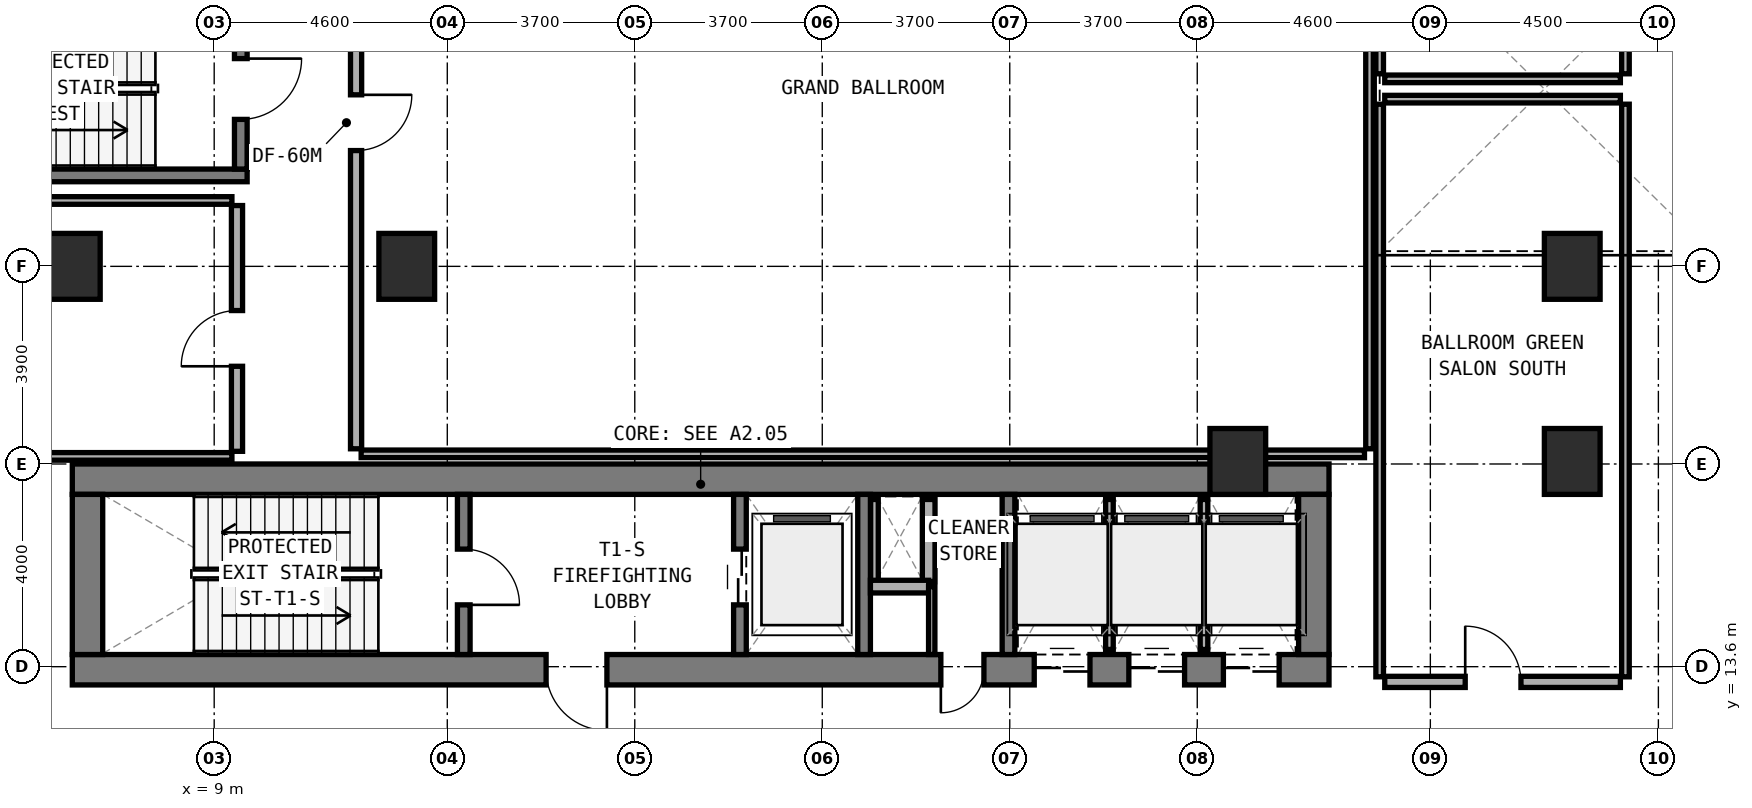
"""IFC4 building model, lengths in metres.
Left out: names, types, materials, properties, quantities, classifications, styles, units other than length and angle.
Written with IfcOpenShell. Run it as: python <this file> out.ifc"""

import sys

from ifc_helpers import new_model, si_unit, direction, frame, frame_2d, origin, origin_2d, place, context, subcontext, project, spatial, rectangle, extrude, element, fill, save


model = new_model("IFC4")
c1 = context("Model", 3, precision=1e-05, world=origin(), true_north=direction((0.0, 1.0)))
c2 = subcontext(c1, "Body", "Model", "MODEL_VIEW")
j1 = project(units=[si_unit("LENGTHUNIT", "METRE"), si_unit("PLANEANGLEUNIT", "RADIAN")], contexts=[c1])
p1 = place(None, origin())
s1 = spatial("IfcSite", under=j1, at=p1, CompositionType="ELEMENT")
p2 = place(p1, origin())
s2 = spatial("IfcBuilding", under=s1, at=p2, CompositionType="ELEMENT")
p3 = place(p2, frame((0.0, 0.0, 10.2)))
s3 = spatial("IfcBuildingStorey", under=s2, at=p3, CompositionType="ELEMENT", Elevation=10.2)
p4 = place(p3, frame((6.2, 13.54, 0.0), z_axis=(0.0, 0.0, 1.0), x_axis=(1.0, 0.0, 0.0)))
e1 = element("IfcWall", 1, at=p4, inside=s3, PredefinedType="SHEAR", context=c2, shape_type="SweptSolid", body=[
    extrude(rectangle(XDim=24.8, YDim=0.6, at=frame_2d((12.4, 0.0))), origin(), (0.0, 0.0, 1.0), 4.8),
])
p5 = place(p4, frame((9.35, 0.0, 0.0)))
e2 = element("IfcOpeningElement", 2, at=p5, cuts=e1, PredefinedType="OPENING", context=c2, shape_type="SweptSolid", body=[
    extrude(rectangle(XDim=1.2, YDim=2.15, at=frame_2d((0.6, 1.075))), frame((0.0, 0.31, 0.0), z_axis=(0.0, -1.0, 0.0), x_axis=(1.0, 0.0, 0.0)), (0.0, 0.0, 1.0), 0.62),
])
p6 = place(p4, frame((17.14, 0.0, 0.0)))
e3 = element("IfcOpeningElement", 3, at=p6, cuts=e1, PredefinedType="OPENING", context=c2, shape_type="SweptSolid", body=[
    extrude(rectangle(XDim=0.85, YDim=2.1, at=frame_2d((0.425, 1.05))), frame((0.0, 0.31, 0.0), z_axis=(0.0, -1.0, 0.0), x_axis=(1.0, 0.0, 0.0)), (0.0, 0.0, 1.0), 0.62),
])
p7 = place(p4, frame((18.983, 0.0, 0.0)))
e4 = element("IfcOpeningElement", 4, at=p7, cuts=e1, PredefinedType="OPENING", context=c2, shape_type="SweptSolid", body=[
    extrude(rectangle(XDim=1.1, YDim=2.15, at=frame_2d((0.55, 1.075))), frame((0.0, 0.31, 0.0), z_axis=(0.0, -1.0, 0.0), x_axis=(1.0, 0.0, 0.0)), (0.0, 0.0, 1.0), 0.62),
])
p8 = place(p4, frame((20.85, 0.0, 0.0)))
e5 = element("IfcOpeningElement", 5, at=p8, cuts=e1, PredefinedType="OPENING", context=c2, shape_type="SweptSolid", body=[
    extrude(rectangle(XDim=1.1, YDim=2.15, at=frame_2d((0.55, 1.075))), frame((0.0, 0.31, 0.0), z_axis=(0.0, -1.0, 0.0), x_axis=(1.0, 0.0, 0.0)), (0.0, 0.0, 1.0), 0.62),
])
p9 = place(p4, frame((22.716, 0.0, 0.0)))
e6 = element("IfcOpeningElement", 6, at=p9, cuts=e1, PredefinedType="OPENING", context=c2, shape_type="SweptSolid", body=[
    extrude(rectangle(XDim=1.1, YDim=2.15, at=frame_2d((0.55, 1.075))), frame((0.0, 0.31, 0.0), z_axis=(0.0, -1.0, 0.0), x_axis=(1.0, 0.0, 0.0)), (0.0, 0.0, 1.0), 0.62),
])
p10 = place(p3, frame((6.2, 17.3, 0.0), z_axis=(0.0, 0.0, 1.0), x_axis=(1.0, 0.0, 0.0)))
e7 = element("IfcWall", 7, at=p10, inside=s3, PredefinedType="SHEAR", context=c2, shape_type="SweptSolid", body=[
    extrude(rectangle(XDim=24.8, YDim=0.6, at=frame_2d((12.4, 0.0))), origin(), (0.0, 0.0, 1.0), 4.8),
])
for number, where, z_axis, x_axis in (
    (8, (6.5, 13.84, 0.0), (0.0, 0.0, 1.0), (0.0, 1.0, 0.0)),
    (9, (30.7, 13.84, 0.0), (0.0, 0.0, 1.0), (0.0, 1.0, 0.0)),
):
    element("IfcWall", number, at=place(p3, frame(where, z_axis=z_axis, x_axis=x_axis)), inside=s3, PredefinedType="SHEAR", context=c2, shape_type="SweptSolid", body=[
        extrude(rectangle(XDim=3.16, YDim=0.6, at=frame_2d((1.58, 0.0))), origin(), (0.0, 0.0, 1.0), 4.8),
    ])
p11 = place(p3, frame((13.925, 13.84, 0.0), z_axis=(0.0, 0.0, 1.0), x_axis=(0.0, 1.0, 0.0)))
e10 = element("IfcWall", 10, at=p11, inside=s3, PredefinedType="STANDARD", context=c2, shape_type="SweptSolid", body=[
    extrude(rectangle(XDim=3.16, YDim=0.25, at=frame_2d((1.58, 0.0))), origin(), (0.0, 0.0, 1.0), 4.45),
])
p12 = place(p11, frame((0.98, 0.0, 0.0)))
e11 = element("IfcOpeningElement", 11, at=p12, cuts=e10, PredefinedType="OPENING", context=c2, shape_type="SweptSolid", body=[
    extrude(rectangle(XDim=1.1, YDim=2.15, at=frame_2d((0.55, 1.075))), frame((0.0, 0.135, 0.0), z_axis=(0.0, -1.0, 0.0), x_axis=(1.0, 0.0, 0.0)), (0.0, 0.0, 1.0), 0.27),
])
p13 = place(p3, frame((19.375, 13.84, 0.0), z_axis=(0.0, 0.0, 1.0), x_axis=(0.0, 1.0, 0.0)))
e12 = element("IfcWall", 12, at=p13, inside=s3, PredefinedType="STANDARD", context=c2, shape_type="SweptSolid", body=[
    extrude(rectangle(XDim=3.16, YDim=0.25, at=frame_2d((1.58, 0.0))), origin(), (0.0, 0.0, 1.0), 4.45),
])
p14 = place(p13, frame((0.98, 0.0, 0.0)))
e13 = element("IfcOpeningElement", 13, at=p14, cuts=e12, PredefinedType="OPENING", context=c2, shape_type="SweptSolid", body=[
    extrude(rectangle(XDim=1.1, YDim=2.15, at=frame_2d((0.55, 1.075))), frame((0.0, 0.135, 0.0), z_axis=(0.0, -1.0, 0.0), x_axis=(1.0, 0.0, 0.0)), (0.0, 0.0, 1.0), 0.27),
])
for number, where, z_axis, x_axis in (
    (14, (21.825, 13.84, 0.0), (0.0, 0.0, 1.0), (0.0, 1.0, 0.0)),
    (15, (24.675, 13.84, 0.0), (0.0, 0.0, 1.0), (0.0, 1.0, 0.0)),
):
    element("IfcWall", number, at=place(p3, frame(where, z_axis=z_axis, x_axis=x_axis)), inside=s3, PredefinedType="STANDARD", context=c2, shape_type="SweptSolid", body=[
        extrude(rectangle(XDim=3.16, YDim=0.25, at=frame_2d((1.58, 0.0))), origin(), (0.0, 0.0, 1.0), 4.45),
    ])
p15 = place(p3, frame((2.15, 23.295, 0.0), z_axis=(0.0, 0.0, 1.0), x_axis=(1.0, 0.0, 0.0)))
e16 = element("IfcWall", 16, at=p15, inside=s3, PredefinedType="STANDARD", context=c2, shape_type="SweptSolid", body=[
    extrude(rectangle(XDim=7.5, YDim=0.25, at=frame_2d((3.75, 0.0))), origin(), (0.0, 0.0, 1.0), 4.8),
])
p16 = place(p3, frame((9.525, 23.42, 0.0), z_axis=(0.0, 0.0, 1.0), x_axis=(0.0, 1.0, 0.0)))
e17 = element("IfcWall", 17, at=p16, inside=s3, PredefinedType="STANDARD", context=c2, shape_type="SweptSolid", body=[
    extrude(rectangle(XDim=3.16, YDim=0.25, at=frame_2d((1.58, 0.0))), origin(), (0.0, 0.0, 1.0), 4.8),
])
p17 = place(p16, frame((0.98, 0.0, 0.0)))
e18 = element("IfcOpeningElement", 18, at=p17, cuts=e17, PredefinedType="OPENING", context=c2, shape_type="SweptSolid", body=[
    extrude(rectangle(XDim=1.2, YDim=2.15, at=frame_2d((0.6, 1.075))), frame((0.0, 0.135, 0.0), z_axis=(0.0, -1.0, 0.0), x_axis=(1.0, 0.0, 0.0)), (0.0, 0.0, 1.0), 0.27),
])
for number, where, z_axis, x_axis in (
    (19, (6.2, 21.5, 0.0), (0.0, 0.0, 1.0), (1.0, 0.0, 0.0)),
    (20, (35.8, 21.5, 0.0), (0.0, 0.0, 1.0), (1.0, 0.0, 0.0)),
    (21, (35.8, 17.65, 0.0), (0.0, 0.0, 1.0), (1.0, 0.0, 0.0)),
    (22, (12.8, 21.5, 0.0), (0.0, 0.0, 1.0), (1.0, 0.0, 0.0)),
    (23, (29.2, 17.65, 0.0), (0.0, 0.0, 1.0), (1.0, 0.0, 0.0)),
):
    element("IfcColumn", number, at=place(p3, frame(where, z_axis=z_axis, x_axis=x_axis)), inside=s3, PredefinedType="COLUMN", context=c2, shape_type="SweptSolid", body=[
        extrude(rectangle(XDim=1.1, YDim=1.3, at=origin_2d()), origin(), (0.0, 0.0, 1.0), 4.8),
    ])
p18 = place(p3, frame((22.03, 15.28, 0.0), z_axis=(0.0, 0.0, 1.0), x_axis=(0.0, 1.0, 0.0)))
e24 = element("IfcWall", 24, at=p18, inside=s3, PredefinedType="PARTITIONING", context=c2, shape_type="SweptSolid", body=[
    extrude(rectangle(XDim=1.62, YDim=0.15, at=frame_2d((0.81, 0.0))), origin(), (0.0, 0.0, 1.0), 4.45),
])
p19 = place(p3, frame((23.1, 15.28, 0.0), z_axis=(0.0, 0.0, 1.0), x_axis=(0.0, 1.0, 0.0)))
e25 = element("IfcWall", 25, at=p19, inside=s3, PredefinedType="SOLIDWALL", context=c2, shape_type="SweptSolid", body=[
    extrude(rectangle(XDim=1.62, YDim=0.25, at=frame_2d((0.81, 0.0))), origin(), (0.0, 0.0, 1.0), 4.45),
])
p20 = place(p3, frame((21.95, 15.18, 0.0), z_axis=(0.0, 0.0, 1.0), x_axis=(1.0, 0.0, 0.0)))
e26 = element("IfcWall", 26, at=p20, inside=s3, PredefinedType="SOLIDWALL", context=c2, shape_type="SweptSolid", body=[
    extrude(rectangle(XDim=1.15, YDim=0.25, at=frame_2d((0.575, 0.0))), origin(), (0.0, 0.0, 1.0), 4.45),
])
p21 = place(p3, frame((23.16, 13.84, 0.0), z_axis=(0.0, 0.0, 1.0), x_axis=(0.0, 1.0, 0.0)))
e27 = element("IfcWall", 27, at=p21, inside=s3, PredefinedType="PARTITIONING", context=c2, shape_type="SweptSolid", body=[
    extrude(rectangle(XDim=1.34, YDim=0.125, at=frame_2d((0.67, 0.0))), origin(), (0.0, 0.0, 1.0), 4.45),
])
p22 = place(p3, frame((26.667, 13.94, 0.0), z_axis=(0.0, 0.0, 1.0), x_axis=(0.0, 1.0, 0.0)))
e28 = element("IfcWall", 28, at=p22, inside=s3, PredefinedType="PARTITIONING", context=c2, shape_type="SweptSolid", body=[
    extrude(rectangle(XDim=2.96, YDim=0.15, at=frame_2d((1.48, 0.0))), origin(), (0.0, 0.0, 1.0), 4.45),
])
p23 = place(p3, frame((28.533, 13.94, 0.0), z_axis=(0.0, 0.0, 1.0), x_axis=(0.0, 1.0, 0.0)))
e29 = element("IfcWall", 29, at=p23, inside=s3, PredefinedType="PARTITIONING", context=c2, shape_type="SweptSolid", body=[
    extrude(rectangle(XDim=2.96, YDim=0.15, at=frame_2d((1.48, 0.0))), origin(), (0.0, 0.0, 1.0), 3.525),
])
p24 = place(p3, frame((31.8, 17.9, 0.0), z_axis=(0.0, 0.0, 1.0), x_axis=(0.0, 1.0, 0.0)))
e30 = element("IfcWall", 30, at=p24, inside=s3, PredefinedType="PARTITIONING", context=c2, shape_type="SweptSolid", body=[
    extrude(rectangle(XDim=14.2, YDim=0.15, at=frame_2d((7.1, 0.0))), origin(), (0.0, 0.0, 1.0), 3.425),
])
p25 = place(p3, frame((11.9, 17.8, 0.0), z_axis=(0.0, 0.0, 1.0), x_axis=(1.0, 0.0, 0.0)))
e31 = element("IfcWall", 31, at=p25, inside=s3, PredefinedType="PARTITIONING", context=c2, shape_type="SweptSolid", body=[
    extrude(rectangle(XDim=19.8, YDim=0.15, at=frame_2d((9.9, 0.0))), origin(), (0.0, 0.0, 1.0), 3.525),
])
p26 = place(p3, frame((11.8, 17.9, 0.0), z_axis=(0.0, 0.0, 1.0), x_axis=(0.0, 1.0, 0.0)))
e32 = element("IfcWall", 32, at=p26, inside=s3, PredefinedType="SOLIDWALL", context=c2, shape_type="SweptSolid", body=[
    extrude(rectangle(XDim=14.2, YDim=0.22, at=frame_2d((7.1, 0.0))), origin(), (0.0, 0.0, 1.0), 3.525),
])
p27 = place(p26, frame((5.885, 0.0, 0.0)))
e33 = element("IfcOpeningElement", 33, at=p27, cuts=e32, PredefinedType="OPENING", context=c2, shape_type="SweptSolid", body=[
    extrude(rectangle(XDim=1.1, YDim=2.1, at=frame_2d((0.55, 1.05))), frame((0.0, 0.12, 0.0), z_axis=(0.0, -1.0, 0.0), x_axis=(1.0, 0.0, 0.0)), (0.0, 0.0, 1.0), 0.24),
])
p28 = place(p3, frame((0.45, 17.75, 0.0), z_axis=(0.0, 0.0, 1.0), x_axis=(1.0, 0.0, 0.0)))
e34 = element("IfcWall", 34, at=p28, inside=s3, PredefinedType="PARTITIONING", context=c2, shape_type="SweptSolid", body=[
    extrude(rectangle(XDim=8.9, YDim=0.15, at=frame_2d((4.45, 0.0))), origin(), (0.0, 0.0, 1.0), 3.725),
])
p29 = place(p3, frame((0.45, 22.8, 0.0), z_axis=(0.0, 0.0, 1.0), x_axis=(1.0, 0.0, 0.0)))
e35 = element("IfcWall", 35, at=p29, inside=s3, PredefinedType="PARTITIONING", context=c2, shape_type="SweptSolid", body=[
    extrude(rectangle(XDim=8.9, YDim=0.15, at=frame_2d((4.45, 0.0))), origin(), (0.0, 0.0, 1.0), 3.925),
])
p30 = place(p3, frame((9.45, 17.85, 0.0), z_axis=(0.0, 0.0, 1.0), x_axis=(0.0, 1.0, 0.0)))
e36 = element("IfcWall", 36, at=p30, inside=s3, PredefinedType="SOLIDWALL", context=c2, shape_type="SweptSolid", body=[
    extrude(rectangle(XDim=4.85, YDim=0.22, at=frame_2d((2.425, 0.0))), origin(), (0.0, 0.0, 1.0), 3.525),
])
p31 = place(p30, frame((1.678, 0.0, 0.0)))
e37 = element("IfcOpeningElement", 37, at=p31, cuts=e36, PredefinedType="OPENING", context=c2, shape_type="SweptSolid", body=[
    extrude(rectangle(XDim=1.1, YDim=2.1, at=frame_2d((0.55, 1.05))), frame((0.0, 0.12, 0.0), z_axis=(0.0, -1.0, 0.0), x_axis=(1.0, 0.0, 0.0)), (0.0, 0.0, 1.0), 0.24),
])
p32 = place(p3, frame((32.0, 13.4, 0.0), z_axis=(0.0, 0.0, 1.0), x_axis=(0.0, 1.0, 0.0)))
e38 = element("IfcWall", 38, at=p32, inside=s3, PredefinedType="PARTITIONING", context=c2, shape_type="SweptSolid", body=[
    extrude(rectangle(XDim=11.3, YDim=0.15, at=frame_2d((5.65, 0.0))), origin(), (0.0, 0.0, 1.0), 3.425),
])
p33 = place(p3, frame((36.85, 13.4, 0.0), z_axis=(0.0, 0.0, 1.0), x_axis=(0.0, 1.0, 0.0)))
e39 = element("IfcWall", 39, at=p33, inside=s3, PredefinedType="PARTITIONING", context=c2, shape_type="SweptSolid", body=[
    extrude(rectangle(XDim=11.3, YDim=0.15, at=frame_2d((5.65, 0.0))), origin(), (0.0, 0.0, 1.0), 3.525),
])
p34 = place(p3, frame((32.1, 24.8, 0.0), z_axis=(0.0, 0.0, 1.0), x_axis=(1.0, 0.0, 0.0)))
e40 = element("IfcWall", 40, at=p34, inside=s3, PredefinedType="PARTITIONING", context=c2, shape_type="SweptSolid", body=[
    extrude(rectangle(XDim=4.65, YDim=0.15, at=frame_2d((2.325, 0.0))), origin(), (0.0, 0.0, 1.0), 3.975),
])
p35 = place(p3, frame((32.1, 13.3, 0.0), z_axis=(0.0, 0.0, 1.0), x_axis=(1.0, 0.0, 0.0)))
e41 = element("IfcWall", 41, at=p35, inside=s3, PredefinedType="SOLIDWALL", context=c2, shape_type="SweptSolid", body=[
    extrude(rectangle(XDim=4.65, YDim=0.22, at=frame_2d((2.325, 0.0))), origin(), (0.0, 0.0, 1.0), 3.975),
])
p36 = place(p35, frame((1.588, 0.0, 0.0)))
e42 = element("IfcOpeningElement", 42, at=p36, cuts=e41, PredefinedType="OPENING", context=c2, shape_type="SweptSolid", body=[
    extrude(rectangle(XDim=1.1, YDim=2.1, at=frame_2d((0.55, 1.05))), frame((0.0, 0.12, 0.0), z_axis=(0.0, -1.0, 0.0), x_axis=(1.0, 0.0, 0.0)), (0.0, 0.0, 1.0), 0.24),
])
for number, where, z_axis, x_axis in (
    (43, (32.0, 25.3, 0.0), (0.0, 0.0, 1.0), (0.0, 1.0, 0.0)),
    (44, (36.85, 25.3, 0.0), (0.0, 0.0, 1.0), (0.0, 1.0, 0.0)),
):
    element("IfcWall", number, at=place(p3, frame(where, z_axis=z_axis, x_axis=x_axis)), inside=s3, PredefinedType="PARTITIONING", context=c2, shape_type="SweptSolid", body=[
        extrude(rectangle(XDim=11.3, YDim=0.15, at=frame_2d((5.65, 0.0))), origin(), (0.0, 0.0, 1.0), 3.525),
    ])
p37 = place(p3, frame((32.1, 25.2, 0.0), z_axis=(0.0, 0.0, 1.0), x_axis=(1.0, 0.0, 0.0)))
e45 = element("IfcWall", 45, at=p37, inside=s3, PredefinedType="PARTITIONING", context=c2, shape_type="SweptSolid", body=[
    extrude(rectangle(XDim=4.65, YDim=0.15, at=frame_2d((2.325, 0.0))), origin(), (0.0, 0.0, 1.0), 3.975),
])
p38 = place(p12, frame((1.1, 0.0, 0.0), z_axis=(0.0, 0.0, 1.0), x_axis=(-1.0, 0.0, 0.0)))
e46 = element("IfcDoor", 46, at=p38, inside=s3, OperationType="SINGLE_SWING_RIGHT", PredefinedType="DOOR", context=c2, shape_type="SweptSolid", body=[
    extrude(rectangle(XDim=1.1, YDim=2.15, at=frame_2d((0.55, 1.075))), frame((0.0, 0.025, 0.0), z_axis=(0.0, -1.0, 0.0), x_axis=(1.0, 0.0, 0.0)), (0.0, 0.0, 1.0), 0.05),
])
fill(e11, e46)
p39 = place(p5, frame((1.2, 0.0, 0.0), z_axis=(0.0, 0.0, 1.0), x_axis=(-1.0, 0.0, 0.0)))
e47 = element("IfcDoor", 47, at=p39, inside=s3, OperationType="SINGLE_SWING_LEFT", PredefinedType="DOOR", context=c2, shape_type="SweptSolid", body=[
    extrude(rectangle(XDim=1.2, YDim=2.15, at=frame_2d((0.6, 1.075))), frame((0.0, 0.025, 0.0), z_axis=(0.0, -1.0, 0.0), x_axis=(1.0, 0.0, 0.0)), (0.0, 0.0, 1.0), 0.05),
])
fill(e2, e47)
p40 = place(p14, origin())
e48 = element("IfcDoor", 48, at=p40, inside=s3, OperationType="DOUBLE_DOOR_SLIDING", PredefinedType="DOOR", context=c2, shape_type="SweptSolid", body=[
    extrude(rectangle(XDim=1.1, YDim=2.15, at=frame_2d((0.55, 1.075))), frame((0.0, 0.025, 0.0), z_axis=(0.0, -1.0, 0.0), x_axis=(1.0, 0.0, 0.0)), (0.0, 0.0, 1.0), 0.05),
])
fill(e13, e48)
p41 = place(p6, frame((0.85, 0.0, 0.0), z_axis=(0.0, 0.0, 1.0), x_axis=(-1.0, 0.0, 0.0)))
e49 = element("IfcDoor", 49, at=p41, inside=s3, OperationType="SINGLE_SWING_RIGHT", PredefinedType="DOOR", context=c2, shape_type="SweptSolid", body=[
    extrude(rectangle(XDim=0.85, YDim=2.1, at=frame_2d((0.425, 1.05))), frame((0.0, 0.025, 0.0), z_axis=(0.0, -1.0, 0.0), x_axis=(1.0, 0.0, 0.0)), (0.0, 0.0, 1.0), 0.05),
])
fill(e3, e49)
p42 = place(p7, frame((1.1, 0.0, 0.0), z_axis=(0.0, 0.0, 1.0), x_axis=(-1.0, 0.0, 0.0)))
e50 = element("IfcDoor", 50, at=p42, inside=s3, OperationType="DOUBLE_DOOR_SLIDING", PredefinedType="DOOR", context=c2, shape_type="SweptSolid", body=[
    extrude(rectangle(XDim=1.1, YDim=2.15, at=frame_2d((0.55, 1.075))), frame((0.0, 0.025, 0.0), z_axis=(0.0, -1.0, 0.0), x_axis=(1.0, 0.0, 0.0)), (0.0, 0.0, 1.0), 0.05),
])
fill(e4, e50)
p43 = place(p8, frame((1.1, 0.0, 0.0), z_axis=(0.0, 0.0, 1.0), x_axis=(-1.0, 0.0, 0.0)))
e51 = element("IfcDoor", 51, at=p43, inside=s3, OperationType="DOUBLE_DOOR_SLIDING", PredefinedType="DOOR", context=c2, shape_type="SweptSolid", body=[
    extrude(rectangle(XDim=1.1, YDim=2.15, at=frame_2d((0.55, 1.075))), frame((0.0, 0.025, 0.0), z_axis=(0.0, -1.0, 0.0), x_axis=(1.0, 0.0, 0.0)), (0.0, 0.0, 1.0), 0.05),
])
fill(e5, e51)
p44 = place(p9, frame((1.1, 0.0, 0.0), z_axis=(0.0, 0.0, 1.0), x_axis=(-1.0, 0.0, 0.0)))
e52 = element("IfcDoor", 52, at=p44, inside=s3, OperationType="DOUBLE_DOOR_SLIDING", PredefinedType="DOOR", context=c2, shape_type="SweptSolid", body=[
    extrude(rectangle(XDim=1.1, YDim=2.15, at=frame_2d((0.55, 1.075))), frame((0.0, 0.025, 0.0), z_axis=(0.0, -1.0, 0.0), x_axis=(1.0, 0.0, 0.0)), (0.0, 0.0, 1.0), 0.05),
])
fill(e6, e52)
p45 = place(p17, frame((1.2, 0.0, 0.0), z_axis=(0.0, 0.0, 1.0), x_axis=(-1.0, 0.0, 0.0)))
e53 = element("IfcDoor", 53, at=p45, inside=s3, OperationType="SINGLE_SWING_LEFT", PredefinedType="DOOR", context=c2, shape_type="SweptSolid", body=[
    extrude(rectangle(XDim=1.2, YDim=2.15, at=frame_2d((0.6, 1.075))), frame((0.0, 0.025, 0.0), z_axis=(0.0, -1.0, 0.0), x_axis=(1.0, 0.0, 0.0)), (0.0, 0.0, 1.0), 0.05),
])
fill(e18, e53)
p46 = place(p27, frame((1.1, 0.0, 0.0), z_axis=(0.0, 0.0, 1.0), x_axis=(-1.0, 0.0, 0.0)))
e54 = element("IfcDoor", 54, at=p46, inside=s3, OperationType="SINGLE_SWING_LEFT", PredefinedType="DOOR", context=c2, shape_type="SweptSolid", body=[
    extrude(rectangle(XDim=1.1, YDim=2.1, at=frame_2d((0.55, 1.05))), frame((0.0, 0.025, 0.0), z_axis=(0.0, -1.0, 0.0), x_axis=(1.0, 0.0, 0.0)), (0.0, 0.0, 1.0), 0.05),
])
fill(e33, e54)
p47 = place(p31, origin())
e55 = element("IfcDoor", 55, at=p47, inside=s3, OperationType="SINGLE_SWING_LEFT", PredefinedType="DOOR", context=c2, shape_type="SweptSolid", body=[
    extrude(rectangle(XDim=1.1, YDim=2.1, at=frame_2d((0.55, 1.05))), frame((0.0, 0.025, 0.0), z_axis=(0.0, -1.0, 0.0), x_axis=(1.0, 0.0, 0.0)), (0.0, 0.0, 1.0), 0.05),
])
fill(e37, e55)
p48 = place(p36, origin())
e56 = element("IfcDoor", 56, at=p48, inside=s3, OperationType="SINGLE_SWING_LEFT", PredefinedType="DOOR", context=c2, shape_type="SweptSolid", body=[
    extrude(rectangle(XDim=1.1, YDim=2.1, at=frame_2d((0.55, 1.05))), frame((0.0, 0.025, 0.0), z_axis=(0.0, -1.0, 0.0), x_axis=(1.0, 0.0, 0.0)), (0.0, 0.0, 1.0), 0.05),
])
fill(e42, e56)
save(model, sys.argv[1])
